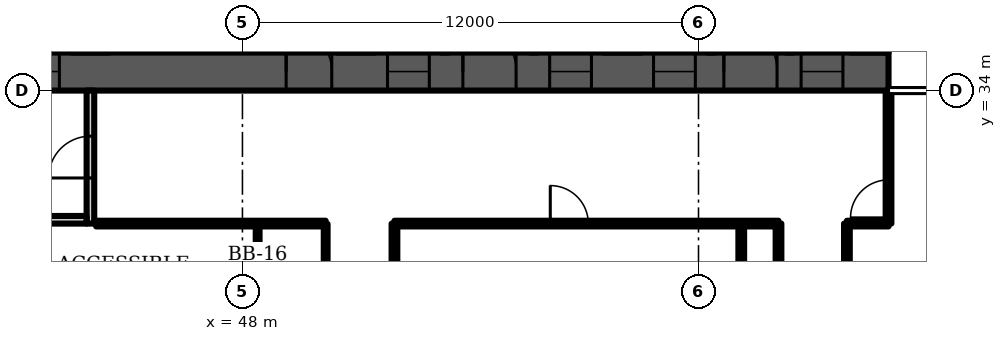
"""IFC4 building model, lengths in metres.
Left out: names, types, materials, properties, quantities, classifications, styles, units other than length and angle.
Written with IfcOpenShell. Run it as: python <this file> out.ifc"""

import sys

from ifc_helpers import new_model, si_unit, direction, frame, frame_2d, origin, place, context, subcontext, project, spatial, rectangle, extrude, element, fill, save


model = new_model("IFC4")
c1 = context("Model", 3, precision=1e-05, world=origin(), true_north=direction((0.0, 1.0)))
c2 = subcontext(c1, "Body", "Model", "MODEL_VIEW")
j1 = project(units=[si_unit("LENGTHUNIT", "METRE"), si_unit("PLANEANGLEUNIT", "RADIAN")], contexts=[c1])
p1 = place(None, origin())
s1 = spatial("IfcSite", under=j1, at=p1, CompositionType="ELEMENT")
p2 = place(p1, origin())
s2 = spatial("IfcBuilding", under=s1, at=p2, CompositionType="ELEMENT")
p3 = place(p2, frame((0.0, 0.0, 147.1)))
s3 = spatial("IfcBuildingStorey", under=s2, at=p3, CompositionType="ELEMENT", Elevation=147.1)
p4 = place(p3, frame((16.0, 34.5, 0.0), z_axis=(0.0, 0.0, 1.0), x_axis=(1.0, 0.0, 0.0)))
e1 = element("IfcWall", 1, at=p4, inside=s3, PredefinedType="SHEAR", context=c2, shape_type="SweptSolid", body=[
    extrude(rectangle(XDim=49.0, YDim=1.0, at=frame_2d((24.5, 0.0))), origin(), (0.0, 0.0, 1.0), 4.8),
])
p5 = place(p4, frame((1.2, 0.0, 0.0)))
e2 = element("IfcOpeningElement", 2, at=p5, cuts=e1, PredefinedType="OPENING", context=c2, shape_type="SweptSolid", body=[
    extrude(rectangle(XDim=1.1, YDim=2.1, at=frame_2d((0.55, 1.05))), frame((0.0, 0.51, 0.0), z_axis=(0.0, -1.0, 0.0), x_axis=(1.0, 0.0, 0.0)), (0.0, 0.0, 1.0), 1.02),
])
p6 = place(p4, frame((5.083, 0.0, 0.0)))
e3 = element("IfcOpeningElement", 3, at=p6, cuts=e1, PredefinedType="OPENING", context=c2, shape_type="SweptSolid", body=[
    extrude(rectangle(XDim=1.1, YDim=2.1, at=frame_2d((0.55, 1.05))), frame((0.0, 0.51, 0.0), z_axis=(0.0, -1.0, 0.0), x_axis=(1.0, 0.0, 0.0)), (0.0, 0.0, 1.0), 1.02),
])
p7 = place(p4, frame((2.933, 0.0, 0.0)))
e4 = element("IfcOpeningElement", 4, at=p7, cuts=e1, PredefinedType="OPENING", context=c2, shape_type="SweptSolid", body=[
    extrude(rectangle(XDim=1.4, YDim=2.1, at=frame_2d((0.7, 1.05))), frame((0.0, 0.51, 0.0), z_axis=(0.0, -1.0, 0.0), x_axis=(1.0, 0.0, 0.0)), (0.0, 0.0, 1.0), 1.02),
])
p8 = place(p4, frame((7.65, 0.0, 0.0)))
e5 = element("IfcOpeningElement", 5, at=p8, cuts=e1, PredefinedType="OPENING", context=c2, shape_type="SweptSolid", body=[
    extrude(rectangle(XDim=1.2, YDim=2.1, at=frame_2d((0.6, 1.05))), frame((0.0, 0.51, 0.0), z_axis=(0.0, -1.0, 0.0), x_axis=(1.0, 0.0, 0.0)), (0.0, 0.0, 1.0), 1.02),
])
p9 = place(p4, frame((14.817, 0.0, 0.0)))
e6 = element("IfcOpeningElement", 6, at=p9, cuts=e1, PredefinedType="OPENING", context=c2, shape_type="SweptSolid", body=[
    extrude(rectangle(XDim=1.1, YDim=2.1, at=frame_2d((0.55, 1.05))), frame((0.0, 0.51, 0.0), z_axis=(0.0, -1.0, 0.0), x_axis=(1.0, 0.0, 0.0)), (0.0, 0.0, 1.0), 1.02),
])
p10 = place(p4, frame((19.083, 0.0, 0.0)))
e7 = element("IfcOpeningElement", 7, at=p10, cuts=e1, PredefinedType="OPENING", context=c2, shape_type="SweptSolid", body=[
    extrude(rectangle(XDim=1.1, YDim=2.1, at=frame_2d((0.55, 1.05))), frame((0.0, 0.51, 0.0), z_axis=(0.0, -1.0, 0.0), x_axis=(1.0, 0.0, 0.0)), (0.0, 0.0, 1.0), 1.02),
])
p11 = place(p4, frame((16.8, 0.0, 0.0)))
e8 = element("IfcOpeningElement", 8, at=p11, cuts=e1, PredefinedType="OPENING", context=c2, shape_type="SweptSolid", body=[
    extrude(rectangle(XDim=1.4, YDim=2.1, at=frame_2d((0.7, 1.05))), frame((0.0, 0.51, 0.0), z_axis=(0.0, -1.0, 0.0), x_axis=(1.0, 0.0, 0.0)), (0.0, 0.0, 1.0), 1.02),
])
p12 = place(p4, frame((21.817, 0.0, 0.0)))
e9 = element("IfcOpeningElement", 9, at=p12, cuts=e1, PredefinedType="OPENING", context=c2, shape_type="SweptSolid", body=[
    extrude(rectangle(XDim=1.1, YDim=2.1, at=frame_2d((0.55, 1.05))), frame((0.0, 0.51, 0.0), z_axis=(0.0, -1.0, 0.0), x_axis=(1.0, 0.0, 0.0)), (0.0, 0.0, 1.0), 1.02),
])
p13 = place(p4, frame((23.95, 0.0, 0.0)))
e10 = element("IfcOpeningElement", 10, at=p13, cuts=e1, PredefinedType="OPENING", context=c2, shape_type="SweptSolid", body=[
    extrude(rectangle(XDim=1.1, YDim=2.1, at=frame_2d((0.55, 1.05))), frame((0.0, 0.51, 0.0), z_axis=(0.0, -1.0, 0.0), x_axis=(1.0, 0.0, 0.0)), (0.0, 0.0, 1.0), 1.02),
])
p14 = place(p4, frame((26.083, 0.0, 0.0)))
e11 = element("IfcOpeningElement", 11, at=p14, cuts=e1, PredefinedType="OPENING", context=c2, shape_type="SweptSolid", body=[
    extrude(rectangle(XDim=1.1, YDim=2.1, at=frame_2d((0.55, 1.05))), frame((0.0, 0.51, 0.0), z_axis=(0.0, -1.0, 0.0), x_axis=(1.0, 0.0, 0.0)), (0.0, 0.0, 1.0), 1.02),
])
p15 = place(p4, frame((33.15, 0.0, 0.0)))
e12 = element("IfcOpeningElement", 12, at=p15, cuts=e1, PredefinedType="OPENING", context=c2, shape_type="SweptSolid", body=[
    extrude(rectangle(XDim=1.2, YDim=2.1, at=frame_2d((0.6, 1.05))), frame((0.0, 0.51, 0.0), z_axis=(0.0, -1.0, 0.0), x_axis=(1.0, 0.0, 0.0)), (0.0, 0.0, 1.0), 1.02),
])
p16 = place(p4, frame((35.817, 0.0, 0.0)))
e13 = element("IfcOpeningElement", 13, at=p16, cuts=e1, PredefinedType="OPENING", context=c2, shape_type="SweptSolid", body=[
    extrude(rectangle(XDim=1.1, YDim=2.1, at=frame_2d((0.55, 1.05))), frame((0.0, 0.51, 0.0), z_axis=(0.0, -1.0, 0.0), x_axis=(1.0, 0.0, 0.0)), (0.0, 0.0, 1.0), 1.02),
])
p17 = place(p4, frame((40.083, 0.0, 0.0)))
e14 = element("IfcOpeningElement", 14, at=p17, cuts=e1, PredefinedType="OPENING", context=c2, shape_type="SweptSolid", body=[
    extrude(rectangle(XDim=1.1, YDim=2.1, at=frame_2d((0.55, 1.05))), frame((0.0, 0.51, 0.0), z_axis=(0.0, -1.0, 0.0), x_axis=(1.0, 0.0, 0.0)), (0.0, 0.0, 1.0), 1.02),
])
p18 = place(p4, frame((37.8, 0.0, 0.0)))
e15 = element("IfcOpeningElement", 15, at=p18, cuts=e1, PredefinedType="OPENING", context=c2, shape_type="SweptSolid", body=[
    extrude(rectangle(XDim=1.4, YDim=2.1, at=frame_2d((0.7, 1.05))), frame((0.0, 0.51, 0.0), z_axis=(0.0, -1.0, 0.0), x_axis=(1.0, 0.0, 0.0)), (0.0, 0.0, 1.0), 1.02),
])
p19 = place(p4, frame((42.817, 0.0, 0.0)))
e16 = element("IfcOpeningElement", 16, at=p19, cuts=e1, PredefinedType="OPENING", context=c2, shape_type="SweptSolid", body=[
    extrude(rectangle(XDim=1.1, YDim=2.1, at=frame_2d((0.55, 1.05))), frame((0.0, 0.51, 0.0), z_axis=(0.0, -1.0, 0.0), x_axis=(1.0, 0.0, 0.0)), (0.0, 0.0, 1.0), 1.02),
])
p20 = place(p4, frame((46.7, 0.0, 0.0)))
e17 = element("IfcOpeningElement", 17, at=p20, cuts=e1, PredefinedType="OPENING", context=c2, shape_type="SweptSolid", body=[
    extrude(rectangle(XDim=1.1, YDim=2.1, at=frame_2d((0.55, 1.05))), frame((0.0, 0.51, 0.0), z_axis=(0.0, -1.0, 0.0), x_axis=(1.0, 0.0, 0.0)), (0.0, 0.0, 1.0), 1.02),
])
p21 = place(p4, frame((44.667, 0.0, 0.0)))
e18 = element("IfcOpeningElement", 18, at=p21, cuts=e1, PredefinedType="OPENING", context=c2, shape_type="SweptSolid", body=[
    extrude(rectangle(XDim=1.4, YDim=2.1, at=frame_2d((0.7, 1.05))), frame((0.0, 0.51, 0.0), z_axis=(0.0, -1.0, 0.0), x_axis=(1.0, 0.0, 0.0)), (0.0, 0.0, 1.0), 1.02),
])
p22 = place(p3, frame((44.0, 30.5, 0.0), z_axis=(0.0, 0.0, 1.0), x_axis=(0.0, 1.0, 0.0)))
e19 = element("IfcWall", 19, at=p22, inside=s3, PredefinedType="PARTITIONING", context=c2, shape_type="SweptSolid", body=[
    extrude(rectangle(XDim=3.5, YDim=0.2, at=frame_2d((1.75, 0.0))), origin(), (0.0, 0.0, 1.0), 4.4),
])
p23 = place(p22, frame((1.2, 0.0, 0.0)))
e20 = element("IfcOpeningElement", 20, at=p23, cuts=e19, PredefinedType="OPENING", context=c2, shape_type="SweptSolid", body=[
    extrude(rectangle(XDim=1.1, YDim=2.1, at=frame_2d((0.55, 1.05))), frame((0.0, 0.11, 0.0), z_axis=(0.0, -1.0, 0.0), x_axis=(1.0, 0.0, 0.0)), (0.0, 0.0, 1.0), 0.22),
])
p24 = place(p3, frame((41.1, 30.6, 0.0), z_axis=(0.0, 0.0, 1.0), x_axis=(1.0, 0.0, 0.0)))
e21 = element("IfcWall", 21, at=p24, inside=s3, PredefinedType="PARTITIONING", context=c2, shape_type="SweptSolid", body=[
    extrude(rectangle(XDim=2.8, YDim=0.2, at=frame_2d((1.4, 0.0))), origin(), (0.0, 0.0, 1.0), 4.4),
])
p25 = place(p3, frame((48.4, 15.5, 0.0), z_axis=(0.0, 0.0, 1.0), x_axis=(0.0, 1.0, 0.0)))
e22 = element("IfcWall", 22, at=p25, inside=s3, PredefinedType="PARTITIONING", context=c2, shape_type="SweptSolid", body=[
    extrude(rectangle(XDim=14.99, YDim=0.1, at=frame_2d((7.495, 0.0))), origin(), (0.0, 0.0, 1.0), 4.4),
])
p26 = place(p25, frame((2.551, 0.0, 0.0)))
e23 = element("IfcOpeningElement", 23, at=p26, cuts=e22, PredefinedType="OPENING", context=c2, shape_type="SweptSolid", body=[
    extrude(rectangle(XDim=0.9, YDim=2.1, at=frame_2d((0.45, 1.05))), frame((0.0, 0.06, 0.0), z_axis=(0.0, -1.0, 0.0), x_axis=(1.0, 0.0, 0.0)), (0.0, 0.0, 1.0), 0.12),
])
p27 = place(p25, frame((8.15, 0.0, 0.0)))
e24 = element("IfcOpeningElement", 24, at=p27, cuts=e22, PredefinedType="OPENING", context=c2, shape_type="SweptSolid", body=[
    extrude(rectangle(XDim=0.9, YDim=2.1, at=frame_2d((0.45, 1.05))), frame((0.0, 0.06, 0.0), z_axis=(0.0, -1.0, 0.0), x_axis=(1.0, 0.0, 0.0)), (0.0, 0.0, 1.0), 0.12),
])
p28 = place(p25, frame((12.7, 0.0, 0.0)))
e25 = element("IfcOpeningElement", 25, at=p28, cuts=e22, PredefinedType="OPENING", context=c2, shape_type="SweptSolid", body=[
    extrude(rectangle(XDim=1.0, YDim=2.1, at=frame_2d((0.5, 1.05))), frame((0.0, 0.06, 0.0), z_axis=(0.0, -1.0, 0.0), x_axis=(1.0, 0.0, 0.0)), (0.0, 0.0, 1.0), 0.12),
])
p29 = place(p3, frame((50.19, 15.5, 0.0), z_axis=(0.0, 0.0, 1.0), x_axis=(0.0, 1.0, 0.0)))
e26 = element("IfcWall", 26, at=p29, inside=s3, PredefinedType="PARTITIONING", context=c2, shape_type="SweptSolid", body=[
    extrude(rectangle(XDim=14.99, YDim=0.1, at=frame_2d((7.495, 0.0))), origin(), (0.0, 0.0, 1.0), 4.4),
])
p30 = place(p29, frame((6.83, 0.0, 0.0)))
e27 = element("IfcOpeningElement", 27, at=p30, cuts=e26, PredefinedType="OPENING", context=c2, shape_type="SweptSolid", body=[
    extrude(rectangle(XDim=1.1, YDim=2.1, at=frame_2d((0.55, 1.05))), frame((0.0, 0.06, 0.0), z_axis=(0.0, -1.0, 0.0), x_axis=(1.0, 0.0, 0.0)), (0.0, 0.0, 1.0), 0.12),
])
p31 = place(p3, frame((52.0, 15.49, 0.0), z_axis=(0.0, 0.0, 1.0), x_axis=(0.0, 1.0, 0.0)))
e28 = element("IfcWall", 28, at=p31, inside=s3, PredefinedType="PARTITIONING", context=c2, shape_type="SweptSolid", body=[
    extrude(rectangle(XDim=15.01, YDim=0.15, at=frame_2d((7.505, 0.0))), origin(), (0.0, 0.0, 1.0), 4.4),
])
p32 = place(p3, frame((52.0, 30.5, 0.0), z_axis=(0.0, 0.0, 1.0), x_axis=(1.0, 0.0, 0.0)))
e29 = element("IfcWall", 29, at=p32, inside=s3, PredefinedType="PARTITIONING", context=c2, shape_type="SweptSolid", body=[
    extrude(rectangle(XDim=10.105, YDim=0.15, at=frame_2d((5.052, 0.0))), origin(), (0.0, 0.0, 1.0), 4.4),
])
p33 = place(p32, frame((4.1, 0.0, 0.0)))
e30 = element("IfcOpeningElement", 30, at=p33, cuts=e29, PredefinedType="OPENING", context=c2, shape_type="SweptSolid", body=[
    extrude(rectangle(XDim=1.0, YDim=2.1, at=frame_2d((0.5, 1.05))), frame((0.0, 0.085, 0.0), z_axis=(0.0, -1.0, 0.0), x_axis=(1.0, 0.0, 0.0)), (0.0, 0.0, 1.0), 0.17),
])
p34 = place(p3, frame((61.125, 15.49, 0.0), z_axis=(0.0, 0.0, 1.0), x_axis=(0.0, 1.0, 0.0)))
e31 = element("IfcWall", 31, at=p34, inside=s3, PredefinedType="PARTITIONING", context=c2, shape_type="SweptSolid", body=[
    extrude(rectangle(XDim=15.01, YDim=0.15, at=frame_2d((7.505, 0.0))), origin(), (0.0, 0.0, 1.0), 4.4),
])
p35 = place(p3, frame((62.105, 23.0, 0.0), z_axis=(0.0, 0.0, 1.0), x_axis=(0.0, 1.0, 0.0)))
e32 = element("IfcWall", 32, at=p35, inside=s3, PredefinedType="PARTITIONING", context=c2, shape_type="SweptSolid", body=[
    extrude(rectangle(XDim=7.5, YDim=0.15, at=frame_2d((3.75, 0.0))), origin(), (0.0, 0.0, 1.0), 4.4),
])
p36 = place(p3, frame((63.905, 27.745, 0.0), z_axis=(0.0, 0.0, 1.0), x_axis=(0.0, 1.0, 0.0)))
e33 = element("IfcWall", 33, at=p36, inside=s3, PredefinedType="PARTITIONING", context=c2, shape_type="SweptSolid", body=[
    extrude(rectangle(XDim=2.755, YDim=0.15, at=frame_2d((1.377, 0.0))), origin(), (0.0, 0.0, 1.0), 4.4),
])
p37 = place(p3, frame((63.905, 30.5, 0.0), z_axis=(0.0, 0.0, 1.0), x_axis=(1.0, 0.0, 0.0)))
e34 = element("IfcWall", 34, at=p37, inside=s3, PredefinedType="PARTITIONING", context=c2, shape_type="SweptSolid", body=[
    extrude(rectangle(XDim=1.095, YDim=0.15, at=frame_2d((0.547, 0.0))), origin(), (0.0, 0.0, 1.0), 4.4),
])
p38 = place(p3, frame((65.0, 30.5, 0.0), z_axis=(0.0, 0.0, 1.0), x_axis=(0.0, 1.0, 0.0)))
e35 = element("IfcWall", 35, at=p38, inside=s3, PredefinedType="PARTITIONING", context=c2, shape_type="SweptSolid", body=[
    extrude(rectangle(XDim=3.48, YDim=0.15, at=frame_2d((1.74, 0.0))), origin(), (0.0, 0.0, 1.0), 4.4),
])
p39 = place(p38, frame((0.15, 0.0, 0.0)))
e36 = element("IfcOpeningElement", 36, at=p39, cuts=e35, PredefinedType="OPENING", context=c2, shape_type="SweptSolid", body=[
    extrude(rectangle(XDim=1.0, YDim=2.1, at=frame_2d((0.5, 1.05))), frame((0.0, 0.085, 0.0), z_axis=(0.0, -1.0, 0.0), x_axis=(1.0, 0.0, 0.0)), (0.0, 0.0, 1.0), 0.17),
])
p40 = place(p3, frame((44.15, 30.5, 0.0), z_axis=(0.0, 0.0, 1.0), x_axis=(1.0, 0.0, 0.0)))
e37 = element("IfcWall", 37, at=p40, inside=s3, PredefinedType="PARTITIONING", context=c2, shape_type="SweptSolid", body=[
    extrude(rectangle(XDim=6.04, YDim=0.15, at=frame_2d((3.02, 0.0))), origin(), (0.0, 0.0, 1.0), 4.4),
])
p41 = place(p14, origin())
e38 = element("IfcDoor", 38, at=p41, inside=s3, OperationType="DOUBLE_DOOR_SLIDING", PredefinedType="DOOR", context=c2, shape_type="SweptSolid", body=[
    extrude(rectangle(XDim=1.1, YDim=2.1, at=frame_2d((0.55, 1.05))), frame((0.0, 0.025, 0.0), z_axis=(0.0, -1.0, 0.0), x_axis=(1.0, 0.0, 0.0)), (0.0, 0.0, 1.0), 0.05),
])
fill(e11, e38)
p42 = place(p15, origin())
e39 = element("IfcDoor", 39, at=p42, inside=s3, OperationType="SINGLE_SWING_LEFT", PredefinedType="DOOR", context=c2, shape_type="SweptSolid", body=[
    extrude(rectangle(XDim=1.2, YDim=2.1, at=frame_2d((0.6, 1.05))), frame((0.0, 0.025, 0.0), z_axis=(0.0, -1.0, 0.0), x_axis=(1.0, 0.0, 0.0)), (0.0, 0.0, 1.0), 0.05),
])
fill(e12, e39)
p43 = place(p16, origin())
e40 = element("IfcDoor", 40, at=p43, inside=s3, OperationType="DOUBLE_DOOR_SLIDING", PredefinedType="DOOR", context=c2, shape_type="SweptSolid", body=[
    extrude(rectangle(XDim=1.1, YDim=2.1, at=frame_2d((0.55, 1.05))), frame((0.0, 0.025, 0.0), z_axis=(0.0, -1.0, 0.0), x_axis=(1.0, 0.0, 0.0)), (0.0, 0.0, 1.0), 0.05),
])
fill(e13, e40)
p44 = place(p17, origin())
e41 = element("IfcDoor", 41, at=p44, inside=s3, OperationType="DOUBLE_DOOR_SLIDING", PredefinedType="DOOR", context=c2, shape_type="SweptSolid", body=[
    extrude(rectangle(XDim=1.1, YDim=2.1, at=frame_2d((0.55, 1.05))), frame((0.0, 0.025, 0.0), z_axis=(0.0, -1.0, 0.0), x_axis=(1.0, 0.0, 0.0)), (0.0, 0.0, 1.0), 0.05),
])
fill(e14, e41)
p45 = place(p18, origin())
e42 = element("IfcDoor", 42, at=p45, inside=s3, OperationType="DOUBLE_DOOR_SINGLE_SWING", PredefinedType="DOOR", context=c2, shape_type="SweptSolid", body=[
    extrude(rectangle(XDim=1.4, YDim=2.1, at=frame_2d((0.7, 1.05))), frame((0.0, 0.025, 0.0), z_axis=(0.0, -1.0, 0.0), x_axis=(1.0, 0.0, 0.0)), (0.0, 0.0, 1.0), 0.05),
])
fill(e15, e42)
p46 = place(p19, origin())
e43 = element("IfcDoor", 43, at=p46, inside=s3, OperationType="DOUBLE_DOOR_SLIDING", PredefinedType="DOOR", context=c2, shape_type="SweptSolid", body=[
    extrude(rectangle(XDim=1.1, YDim=2.1, at=frame_2d((0.55, 1.05))), frame((0.0, 0.025, 0.0), z_axis=(0.0, -1.0, 0.0), x_axis=(1.0, 0.0, 0.0)), (0.0, 0.0, 1.0), 0.05),
])
fill(e16, e43)
p47 = place(p20, origin())
e44 = element("IfcDoor", 44, at=p47, inside=s3, OperationType="DOUBLE_DOOR_SLIDING", PredefinedType="DOOR", context=c2, shape_type="SweptSolid", body=[
    extrude(rectangle(XDim=1.1, YDim=2.1, at=frame_2d((0.55, 1.05))), frame((0.0, 0.025, 0.0), z_axis=(0.0, -1.0, 0.0), x_axis=(1.0, 0.0, 0.0)), (0.0, 0.0, 1.0), 0.05),
])
fill(e17, e44)
p48 = place(p21, origin())
e45 = element("IfcDoor", 45, at=p48, inside=s3, OperationType="DOUBLE_DOOR_SINGLE_SWING", PredefinedType="DOOR", context=c2, shape_type="SweptSolid", body=[
    extrude(rectangle(XDim=1.4, YDim=2.1, at=frame_2d((0.7, 1.05))), frame((0.0, 0.025, 0.0), z_axis=(0.0, -1.0, 0.0), x_axis=(1.0, 0.0, 0.0)), (0.0, 0.0, 1.0), 0.05),
])
fill(e18, e45)
p49 = place(p23, origin())
e46 = element("IfcDoor", 46, at=p49, inside=s3, OperationType="SINGLE_SWING_LEFT", PredefinedType="DOOR", context=c2, shape_type="SweptSolid", body=[
    extrude(rectangle(XDim=1.1, YDim=2.1, at=frame_2d((0.55, 1.05))), frame((0.0, 0.025, 0.0), z_axis=(0.0, -1.0, 0.0), x_axis=(1.0, 0.0, 0.0)), (0.0, 0.0, 1.0), 0.05),
])
fill(e20, e46)
p50 = place(p33, origin())
e47 = element("IfcDoor", 47, at=p50, inside=s3, OperationType="SINGLE_SWING_LEFT", PredefinedType="DOOR", context=c2, shape_type="SweptSolid", body=[
    extrude(rectangle(XDim=1.0, YDim=2.1, at=frame_2d((0.5, 1.05))), frame((0.0, 0.025, 0.0), z_axis=(0.0, -1.0, 0.0), x_axis=(1.0, 0.0, 0.0)), (0.0, 0.0, 1.0), 0.05),
])
fill(e30, e47)
p51 = place(p39, origin())
e48 = element("IfcDoor", 48, at=p51, inside=s3, OperationType="SINGLE_SWING_LEFT", PredefinedType="DOOR", context=c2, shape_type="SweptSolid", body=[
    extrude(rectangle(XDim=1.0, YDim=2.1, at=frame_2d((0.5, 1.05))), frame((0.0, 0.025, 0.0), z_axis=(0.0, -1.0, 0.0), x_axis=(1.0, 0.0, 0.0)), (0.0, 0.0, 1.0), 0.05),
])
fill(e36, e48)
save(model, sys.argv[1])
